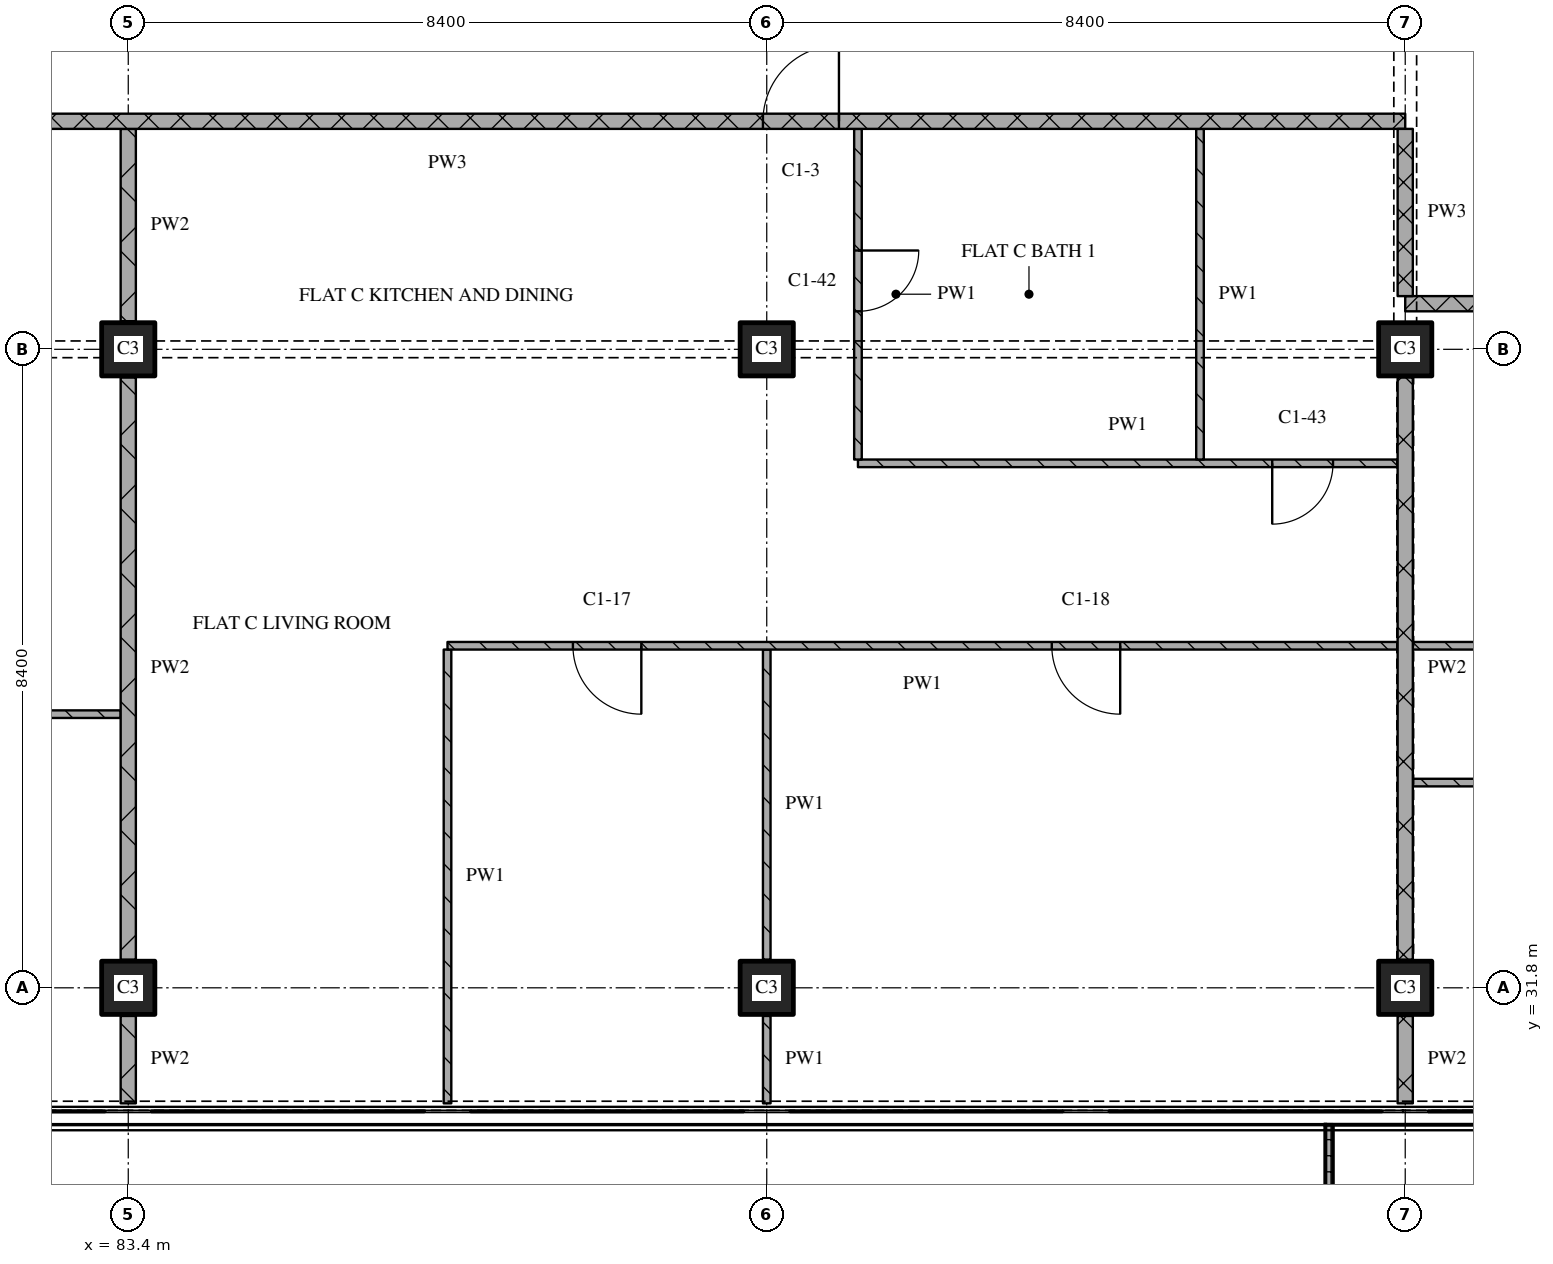
"""IFC4 building model, lengths in metres.
Left out: names, types, materials, properties, quantities, classifications, styles, units other than length and angle.
Written with IfcOpenShell. Run it as: python <this file> out.ifc"""

import sys

from ifc_helpers import new_model, si_unit, direction, frame, frame_2d, origin, origin_2d, place, context, subcontext, project, spatial, polyline, rectangle, outline, extrude, element, fill, save


model = new_model("IFC4")
c1 = context("Model", 3, precision=1e-05, world=origin(), true_north=direction((0.0, 1.0)))
c2 = subcontext(c1, "Body", "Model", "MODEL_VIEW")
j1 = project(units=[si_unit("LENGTHUNIT", "METRE"), si_unit("PLANEANGLEUNIT", "RADIAN")], contexts=[c1])
p1 = place(None, origin())
s1 = spatial("IfcSite", under=j1, at=p1, CompositionType="ELEMENT")
p2 = place(p1, origin())
s2 = spatial("IfcBuilding", under=s1, at=p2, CompositionType="ELEMENT")
p3 = place(p2, frame((0.0, 0.0, 147.45)))
s3 = spatial("IfcBuildingStorey", under=s2, at=p3, CompositionType="ELEMENT", Elevation=147.45)
for number, where, z_axis, x_axis in (
    (1, (83.4, 31.8, 0.0), (0.0, 0.0, 1.0), (1.0, 0.0, 0.0)),
    (2, (83.4, 40.2, 0.0), (0.0, 0.0, 1.0), (1.0, 0.0, 0.0)),
    (3, (91.8, 31.8, 0.0), (0.0, 0.0, 1.0), (1.0, 0.0, 0.0)),
    (4, (91.8, 40.2, 0.0), (0.0, 0.0, 1.0), (1.0, 0.0, 0.0)),
    (5, (100.2, 31.8, 0.0), (0.0, 0.0, 1.0), (1.0, 0.0, 0.0)),
    (6, (100.2, 40.2, 0.0), (0.0, 0.0, 1.0), (1.0, 0.0, 0.0)),
):
    element("IfcColumn", number, at=place(p3, frame(where, z_axis=z_axis, x_axis=x_axis)), inside=s3, PredefinedType="COLUMN", context=c2, shape_type="SweptSolid", body=[
        extrude(rectangle(XDim=0.7, YDim=0.7, at=origin_2d()), origin(), (0.0, 0.0, 1.0), 3.6),
    ])
p4 = place(p3, origin())
e7 = element("IfcWall", 7, at=p4, inside=s3, PredefinedType="SOLIDWALL", context=c2, shape_type="SweptSolid", body=[
    extrude(outline(polyline([(99.15, 30.0), (99.25, 30.0), (99.25, 28.233), (105.35, 28.233), (105.35, 30.0), (105.45, 30.0), (105.45, 28.133), (99.15, 28.133), (99.15, 30.0)])), origin(), (0.0, 0.0, 1.0), 1.0),
])
p5 = place(p3, frame((117.0, 34.5, 0.0), z_axis=(0.0, 0.0, 1.0), x_axis=(-1.0, 0.0, 0.0)))
e8 = element("IfcWall", 8, at=p5, inside=s3, PredefinedType="PARTITIONING", context=c2, shape_type="SweptSolid", body=[
    extrude(rectangle(XDim=16.7, YDim=0.1, at=frame_2d((8.35, 0.0))), origin(), (0.0, 0.0, 1.0), 3.32),
])
p6 = place(p5, frame((7.95, 0.0, 0.0)))
e9 = element("IfcOpeningElement", 9, at=p6, cuts=e8, PredefinedType="OPENING", context=c2, shape_type="SweptSolid", body=[
    extrude(rectangle(XDim=0.9, YDim=2.1, at=frame_2d((0.45, 1.05))), frame((0.0, 0.06, 0.0), z_axis=(0.0, -1.0, 0.0), x_axis=(1.0, 0.0, 0.0)), (0.0, 0.0, 1.0), 0.12),
])
p7 = place(p5, frame((14.25, 0.0, 0.0)))
e10 = element("IfcOpeningElement", 10, at=p7, cuts=e8, PredefinedType="OPENING", context=c2, shape_type="SweptSolid", body=[
    extrude(rectangle(XDim=0.9, YDim=2.1, at=frame_2d((0.45, 1.05))), frame((0.0, 0.06, 0.0), z_axis=(0.0, -1.0, 0.0), x_axis=(1.0, 0.0, 0.0)), (0.0, 0.0, 1.0), 0.12),
])
p8 = place(p3, frame((83.3, 35.4, 0.0), z_axis=(0.0, 0.0, 1.0), x_axis=(-1.0, 0.0, 0.0)))
e11 = element("IfcWall", 11, at=p8, inside=s3, PredefinedType="PARTITIONING", context=c2, shape_type="SweptSolid", body=[
    extrude(rectangle(XDim=4.1, YDim=0.1, at=frame_2d((2.05, 0.0))), origin(), (0.0, 0.0, 1.0), 3.32),
])
p9 = place(p8, frame((1.55, 0.0, 0.0)))
e12 = element("IfcOpeningElement", 12, at=p9, cuts=e11, PredefinedType="OPENING", context=c2, shape_type="SweptSolid", body=[
    extrude(rectangle(XDim=0.9, YDim=2.1, at=frame_2d((0.45, 1.05))), frame((0.0, 0.06, 0.0), z_axis=(0.0, -1.0, 0.0), x_axis=(1.0, 0.0, 0.0)), (0.0, 0.0, 1.0), 0.12),
])
p10 = place(p3, frame((93.0, 38.7, 0.0), z_axis=(0.0, 0.0, 1.0), x_axis=(1.0, 0.0, 0.0)))
e13 = element("IfcWall", 13, at=p10, inside=s3, PredefinedType="PARTITIONING", context=c2, shape_type="SweptSolid", body=[
    extrude(rectangle(XDim=7.1, YDim=0.1, at=frame_2d((3.55, 0.0))), origin(), (0.0, 0.0, 1.0), 3.32),
])
p11 = place(p10, frame((5.45, 0.0, 0.0)))
e14 = element("IfcOpeningElement", 14, at=p11, cuts=e13, PredefinedType="OPENING", context=c2, shape_type="SweptSolid", body=[
    extrude(rectangle(XDim=0.8, YDim=2.1, at=frame_2d((0.4, 1.05))), frame((0.0, 0.06, 0.0), z_axis=(0.0, -1.0, 0.0), x_axis=(1.0, 0.0, 0.0)), (0.0, 0.0, 1.0), 0.12),
])
p12 = place(p3, frame((124.48, 40.8, 0.0), z_axis=(0.0, 0.0, 1.0), x_axis=(-1.0, 0.0, 0.0)))
e15 = element("IfcWall", 15, at=p12, inside=s3, PredefinedType="PARTITIONING", context=c2, shape_type="SweptSolid", body=[
    extrude(rectangle(XDim=24.28, YDim=0.2, at=frame_2d((12.14, 0.0))), origin(), (0.0, 0.0, 1.0), 3.32),
])
p13 = place(p12, frame((10.73, 0.0, 0.0)))
e16 = element("IfcOpeningElement", 16, at=p13, cuts=e15, PredefinedType="OPENING", context=c2, shape_type="SweptSolid", body=[
    extrude(rectangle(XDim=1.0, YDim=2.1, at=frame_2d((0.5, 1.05))), frame((0.0, 0.11, 0.0), z_axis=(0.0, -1.0, 0.0), x_axis=(1.0, 0.0, 0.0)), (0.0, 0.0, 1.0), 0.22),
])
p14 = place(p3, frame((100.2, 43.2, 0.0), z_axis=(0.0, 0.0, 1.0), x_axis=(-1.0, 0.0, 0.0)))
e17 = element("IfcWall", 17, at=p14, inside=s3, PredefinedType="PARTITIONING", context=c2, shape_type="SweptSolid", body=[
    extrude(rectangle(XDim=25.2, YDim=0.2, at=frame_2d((12.6, 0.0))), origin(), (0.0, 0.0, 1.0), 3.32),
])
p15 = place(p14, frame((7.45, 0.0, 0.0)))
e18 = element("IfcOpeningElement", 18, at=p15, cuts=e17, PredefinedType="OPENING", context=c2, shape_type="SweptSolid", body=[
    extrude(rectangle(XDim=1.0, YDim=2.1, at=frame_2d((0.5, 1.05))), frame((0.0, 0.11, 0.0), z_axis=(0.0, -1.0, 0.0), x_axis=(1.0, 0.0, 0.0)), (0.0, 0.0, 1.0), 0.22),
])
p16 = place(p14, frame((20.95, 0.0, 0.0)))
e19 = element("IfcOpeningElement", 19, at=p16, cuts=e17, PredefinedType="OPENING", context=c2, shape_type="SweptSolid", body=[
    extrude(rectangle(XDim=1.0, YDim=2.1, at=frame_2d((0.5, 1.05))), frame((0.0, 0.11, 0.0), z_axis=(0.0, -1.0, 0.0), x_axis=(1.0, 0.0, 0.0)), (0.0, 0.0, 1.0), 0.22),
])
p17 = place(p3, frame((83.4, 31.43, 0.0), z_axis=(0.0, 0.0, 1.0), x_axis=(0.0, -1.0, 0.0)))
e20 = element("IfcWall", 20, at=p17, inside=s3, PredefinedType="PARTITIONING", context=c2, shape_type="SweptSolid", body=[
    extrude(rectangle(XDim=1.15, YDim=0.2, at=frame_2d((0.575, 0.0))), origin(), (0.0, 0.0, 1.0), 3.32),
])
p18 = place(p3, frame((83.4, 39.83, 0.0), z_axis=(0.0, 0.0, 1.0), x_axis=(0.0, -1.0, 0.0)))
e21 = element("IfcWall", 21, at=p18, inside=s3, PredefinedType="PARTITIONING", context=c2, shape_type="SweptSolid", body=[
    extrude(rectangle(XDim=7.66, YDim=0.2, at=frame_2d((3.83, 0.0))), origin(), (0.0, 0.0, 1.0), 3.32),
])
p19 = place(p3, frame((83.4, 43.1, 0.0), z_axis=(0.0, 0.0, 1.0), x_axis=(0.0, -1.0, 0.0)))
e22 = element("IfcWall", 22, at=p19, inside=s3, PredefinedType="PARTITIONING", context=c2, shape_type="SweptSolid", body=[
    extrude(rectangle(XDim=2.53, YDim=0.2, at=frame_2d((1.265, 0.0))), origin(), (0.0, 0.0, 1.0), 3.32),
])
p20 = place(p3, frame((87.6, 36.25, 0.0), z_axis=(0.0, 0.0, 1.0), x_axis=(0.0, -1.0, 0.0)))
e23 = element("IfcWall", 23, at=p20, inside=s3, PredefinedType="PARTITIONING", context=c2, shape_type="SweptSolid", body=[
    extrude(rectangle(XDim=5.97, YDim=0.1, at=frame_2d((2.985, 0.0))), origin(), (0.0, 0.0, 1.0), 3.32),
])
p21 = place(p3, frame((91.8, 31.43, 0.0), z_axis=(0.0, 0.0, 1.0), x_axis=(0.0, -1.0, 0.0)))
e24 = element("IfcWall", 24, at=p21, inside=s3, PredefinedType="PARTITIONING", context=c2, shape_type="SweptSolid", body=[
    extrude(rectangle(XDim=1.15, YDim=0.1, at=frame_2d((0.575, 0.0))), origin(), (0.0, 0.0, 1.0), 3.32),
])
p22 = place(p3, frame((91.8, 36.25, 0.0), z_axis=(0.0, 0.0, 1.0), x_axis=(0.0, -1.0, 0.0)))
e25 = element("IfcWall", 25, at=p22, inside=s3, PredefinedType="PARTITIONING", context=c2, shape_type="SweptSolid", body=[
    extrude(rectangle(XDim=4.08, YDim=0.1, at=frame_2d((2.04, 0.0))), origin(), (0.0, 0.0, 1.0), 3.32),
])
p23 = place(p3, frame((93.0, 43.1, 0.0), z_axis=(0.0, 0.0, 1.0), x_axis=(0.0, -1.0, 0.0)))
e26 = element("IfcWall", 26, at=p23, inside=s3, PredefinedType="PARTITIONING", context=c2, shape_type="SweptSolid", body=[
    extrude(rectangle(XDim=4.35, YDim=0.1, at=frame_2d((2.175, 0.0))), origin(), (0.0, 0.0, 1.0), 3.32),
])
p24 = place(p23, frame((1.6, 0.0, 0.0)))
e27 = element("IfcOpeningElement", 27, at=p24, cuts=e26, PredefinedType="OPENING", context=c2, shape_type="SweptSolid", body=[
    extrude(rectangle(XDim=0.8, YDim=2.1, at=frame_2d((0.4, 1.05))), frame((0.0, 0.06, 0.0), z_axis=(0.0, -1.0, 0.0), x_axis=(1.0, 0.0, 0.0)), (0.0, 0.0, 1.0), 0.12),
])
p25 = place(p3, frame((97.5, 43.1, 0.0), z_axis=(0.0, 0.0, 1.0), x_axis=(0.0, -1.0, 0.0)))
e28 = element("IfcWall", 28, at=p25, inside=s3, PredefinedType="PARTITIONING", context=c2, shape_type="SweptSolid", body=[
    extrude(rectangle(XDim=4.35, YDim=0.1, at=frame_2d((2.175, 0.0))), origin(), (0.0, 0.0, 1.0), 3.32),
])
p26 = place(p3, frame((100.2, 43.1, 0.0), z_axis=(0.0, 0.0, 1.0), x_axis=(0.0, -1.0, 0.0)))
e29 = element("IfcWall", 29, at=p26, inside=s3, PredefinedType="PARTITIONING", context=c2, shape_type="SweptSolid", body=[
    extrude(rectangle(XDim=2.2, YDim=0.2, at=frame_2d((1.1, 0.0))), origin(), (0.0, 0.0, 1.0), 2.43),
])
p27 = place(p3, frame((100.2, 31.43, 0.0), z_axis=(0.0, 0.0, 1.0), x_axis=(0.0, -1.0, 0.0)))
e30 = element("IfcWall", 30, at=p27, inside=s3, PredefinedType="PARTITIONING", context=c2, shape_type="SweptSolid", body=[
    extrude(rectangle(XDim=1.15, YDim=0.2, at=frame_2d((0.575, 0.0))), origin(), (0.0, 0.0, 1.0), 3.32),
])
p28 = place(p3, frame((100.2, 39.83, 0.0), z_axis=(0.0, 0.0, 1.0), x_axis=(0.0, -1.0, 0.0)))
e31 = element("IfcWall", 31, at=p28, inside=s3, PredefinedType="PARTITIONING", context=c2, shape_type="SweptSolid", body=[
    extrude(rectangle(XDim=7.66, YDim=0.2, at=frame_2d((3.83, 0.0))), origin(), (0.0, 0.0, 1.0), 2.72),
])
p29 = place(p3, frame((100.1, 36.3, 0.0), z_axis=(0.0, 0.0, 1.0), x_axis=(-1.0, 0.0, 0.0)))
e32 = element("IfcWall", 32, at=p29, inside=s3, PredefinedType="PARTITIONING", context=c2, shape_type="SweptSolid", body=[
    extrude(rectangle(XDim=12.5, YDim=0.1, at=frame_2d((6.25, 0.0))), origin(), (0.0, 0.0, 1.0), 3.32),
])
p30 = place(p29, frame((3.65, 0.0, 0.0)))
e33 = element("IfcOpeningElement", 33, at=p30, cuts=e32, PredefinedType="OPENING", context=c2, shape_type="SweptSolid", body=[
    extrude(rectangle(XDim=0.9, YDim=2.1, at=frame_2d((0.45, 1.05))), frame((0.0, 0.06, 0.0), z_axis=(0.0, -1.0, 0.0), x_axis=(1.0, 0.0, 0.0)), (0.0, 0.0, 1.0), 0.12),
])
p31 = place(p29, frame((9.95, 0.0, 0.0)))
e34 = element("IfcOpeningElement", 34, at=p31, cuts=e32, PredefinedType="OPENING", context=c2, shape_type="SweptSolid", body=[
    extrude(rectangle(XDim=0.9, YDim=2.1, at=frame_2d((0.45, 1.05))), frame((0.0, 0.06, 0.0), z_axis=(0.0, -1.0, 0.0), x_axis=(1.0, 0.0, 0.0)), (0.0, 0.0, 1.0), 0.12),
])
p32 = place(p3, frame((100.3, 36.3, 0.0), z_axis=(0.0, 0.0, 1.0), x_axis=(1.0, 0.0, 0.0)))
e35 = element("IfcWall", 35, at=p32, inside=s3, PredefinedType="PARTITIONING", context=c2, shape_type="SweptSolid", body=[
    extrude(rectangle(XDim=12.2, YDim=0.1, at=frame_2d((6.1, 0.0))), origin(), (0.0, 0.0, 1.0), 3.32),
])
p33 = place(p32, frame((1.75, 0.0, 0.0)))
e36 = element("IfcOpeningElement", 36, at=p33, cuts=e35, PredefinedType="OPENING", context=c2, shape_type="SweptSolid", body=[
    extrude(rectangle(XDim=0.8, YDim=2.1, at=frame_2d((0.4, 1.05))), frame((0.0, 0.06, 0.0), z_axis=(0.0, -1.0, 0.0), x_axis=(1.0, 0.0, 0.0)), (0.0, 0.0, 1.0), 0.12),
])
p34 = place(p32, frame((6.25, 0.0, 0.0)))
e37 = element("IfcOpeningElement", 37, at=p34, cuts=e35, PredefinedType="OPENING", context=c2, shape_type="SweptSolid", body=[
    extrude(rectangle(XDim=0.8, YDim=2.1, at=frame_2d((0.4, 1.05))), frame((0.0, 0.06, 0.0), z_axis=(0.0, -1.0, 0.0), x_axis=(1.0, 0.0, 0.0)), (0.0, 0.0, 1.0), 0.12),
])
p35 = place(p11, origin())
e38 = element("IfcDoor", 38, at=p35, inside=s3, OperationType="SINGLE_SWING_RIGHT", PredefinedType="DOOR", context=c2, shape_type="SweptSolid", body=[
    extrude(rectangle(XDim=0.8, YDim=2.1, at=frame_2d((0.4, 1.05))), frame((0.0, 0.025, 0.0), z_axis=(0.0, -1.0, 0.0), x_axis=(1.0, 0.0, 0.0)), (0.0, 0.0, 1.0), 0.05),
])
fill(e14, e38)
p36 = place(p15, origin())
e39 = element("IfcDoor", 39, at=p36, inside=s3, OperationType="SINGLE_SWING_RIGHT", PredefinedType="DOOR", context=c2, shape_type="SweptSolid", body=[
    extrude(rectangle(XDim=1.0, YDim=2.1, at=frame_2d((0.5, 1.05))), frame((0.0, 0.025, 0.0), z_axis=(0.0, -1.0, 0.0), x_axis=(1.0, 0.0, 0.0)), (0.0, 0.0, 1.0), 0.05),
])
fill(e18, e39)
p37 = place(p24, origin())
e40 = element("IfcDoor", 40, at=p37, inside=s3, OperationType="SINGLE_SWING_LEFT", PredefinedType="DOOR", context=c2, shape_type="SweptSolid", body=[
    extrude(rectangle(XDim=0.8, YDim=2.1, at=frame_2d((0.4, 1.05))), frame((0.0, 0.025, 0.0), z_axis=(0.0, -1.0, 0.0), x_axis=(1.0, 0.0, 0.0)), (0.0, 0.0, 1.0), 0.05),
])
fill(e27, e40)
p38 = place(p30, origin())
e41 = element("IfcDoor", 41, at=p38, inside=s3, OperationType="SINGLE_SWING_LEFT", PredefinedType="DOOR", context=c2, shape_type="SweptSolid", body=[
    extrude(rectangle(XDim=0.9, YDim=2.1, at=frame_2d((0.45, 1.05))), frame((0.0, 0.025, 0.0), z_axis=(0.0, -1.0, 0.0), x_axis=(1.0, 0.0, 0.0)), (0.0, 0.0, 1.0), 0.05),
])
fill(e33, e41)
p39 = place(p31, origin())
e42 = element("IfcDoor", 42, at=p39, inside=s3, OperationType="SINGLE_SWING_LEFT", PredefinedType="DOOR", context=c2, shape_type="SweptSolid", body=[
    extrude(rectangle(XDim=0.9, YDim=2.1, at=frame_2d((0.45, 1.05))), frame((0.0, 0.025, 0.0), z_axis=(0.0, -1.0, 0.0), x_axis=(1.0, 0.0, 0.0)), (0.0, 0.0, 1.0), 0.05),
])
fill(e34, e42)
save(model, sys.argv[1])
